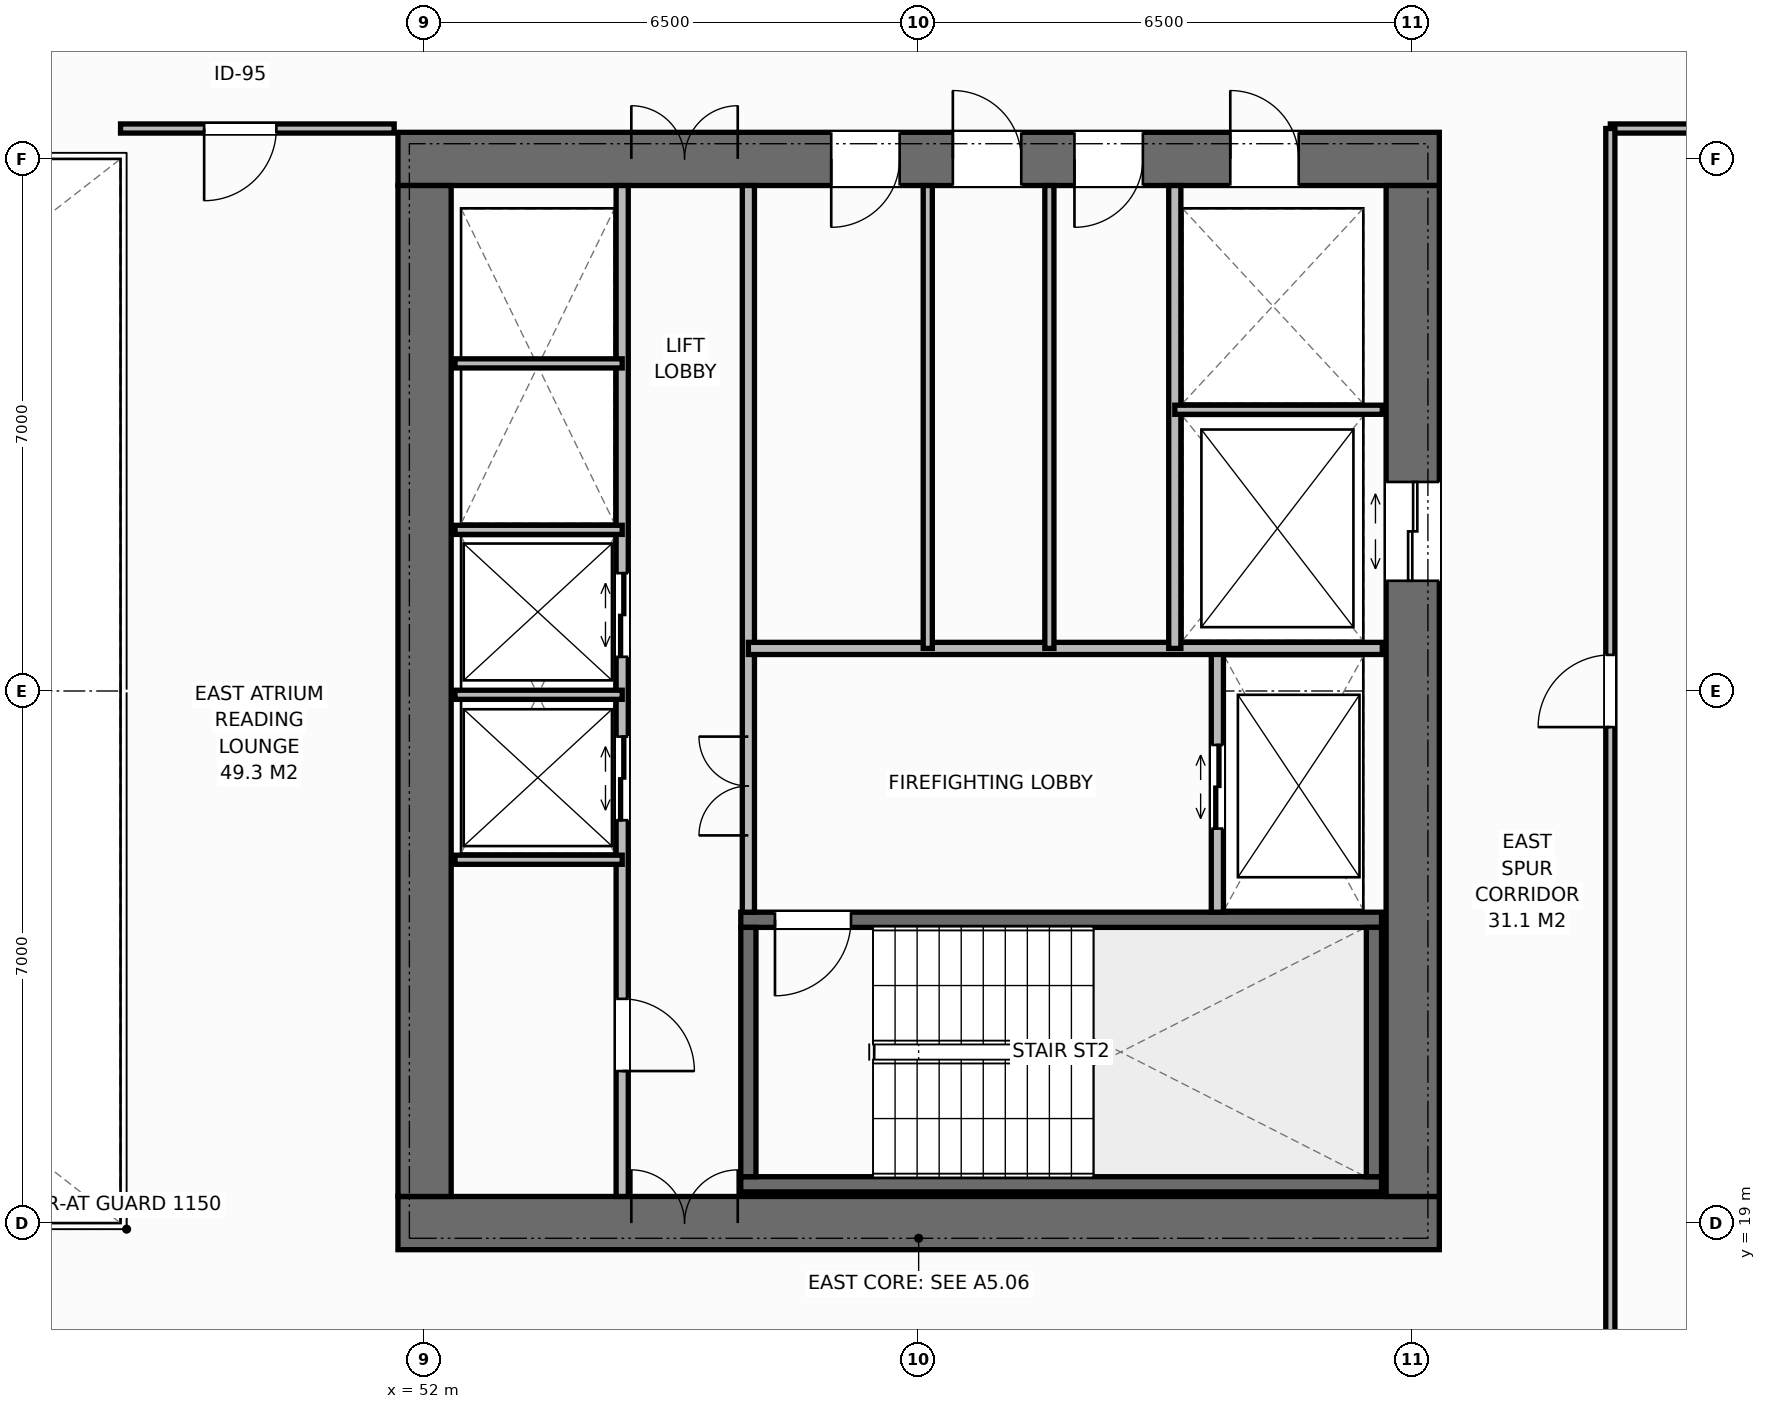
"""IFC4 building model, lengths in metres.
Left out: names, types, materials, properties, quantities, classifications, styles, units other than length and angle.
Written with IfcOpenShell. Run it as: python <this file> out.ifc"""

import sys

from ifc_helpers import new_model, si_unit, direction, frame, frame_2d, origin, place, context, subcontext, project, spatial, rectangle, extrude, element, fill, save


model = new_model("IFC4")
c1 = context("Model", 3, precision=1e-05, world=origin(), true_north=direction((0.0, 1.0)))
c2 = subcontext(c1, "Body", "Model", "MODEL_VIEW")
j1 = project(units=[si_unit("LENGTHUNIT", "METRE"), si_unit("PLANEANGLEUNIT", "RADIAN")], contexts=[c1])
p1 = place(None, origin())
s1 = spatial("IfcSite", under=j1, at=p1, CompositionType="ELEMENT")
p2 = place(p1, origin())
s2 = spatial("IfcBuilding", under=s1, at=p2, CompositionType="ELEMENT")
p3 = place(p2, frame((0.0, 0.0, 112.6)))
s3 = spatial("IfcBuildingStorey", under=s2, at=p3, CompositionType="ELEMENT", Elevation=112.6)
p4 = place(p3, frame((51.65, 19.0, 0.0), z_axis=(0.0, 0.0, 1.0), x_axis=(1.0, 0.0, 0.0)))
e1 = element("IfcWall", 1, at=p4, inside=s3, PredefinedType="SHEAR", context=c2, shape_type="SweptSolid", body=[
    extrude(rectangle(XDim=13.7, YDim=0.7, at=frame_2d((6.85, 0.0))), origin(), (0.0, 0.0, 1.0), 3.8),
])
p5 = place(p4, frame((3.07, 0.0, 0.0)))
e2 = element("IfcOpeningElement", 2, at=p5, cuts=e1, PredefinedType="OPENING", context=c2, shape_type="SweptSolid", body=[
    extrude(rectangle(XDim=1.4, YDim=2.2, at=frame_2d((0.7, 1.1))), frame((0.0, 0.36, 0.0), z_axis=(0.0, -1.0, 0.0), x_axis=(1.0, 0.0, 0.0)), (0.0, 0.0, 1.0), 0.72),
])
p6 = place(p3, frame((51.65, 33.0, 0.0), z_axis=(0.0, 0.0, 1.0), x_axis=(1.0, 0.0, 0.0)))
e3 = element("IfcWall", 3, at=p6, inside=s3, PredefinedType="SHEAR", context=c2, shape_type="SweptSolid", body=[
    extrude(rectangle(XDim=13.7, YDim=0.7, at=frame_2d((6.85, 0.0))), origin(), (0.0, 0.0, 1.0), 3.8),
])
p7 = place(p6, frame((3.07, 0.0, 0.0)))
e4 = element("IfcOpeningElement", 4, at=p7, cuts=e3, PredefinedType="OPENING", context=c2, shape_type="SweptSolid", body=[
    extrude(rectangle(XDim=1.4, YDim=2.2, at=frame_2d((0.7, 1.1))), frame((0.0, 0.36, 0.0), z_axis=(0.0, -1.0, 0.0), x_axis=(1.0, 0.0, 0.0)), (0.0, 0.0, 1.0), 0.72),
])
p8 = place(p6, frame((10.95, 0.0, 0.0)))
e5 = element("IfcOpeningElement", 5, at=p8, cuts=e3, PredefinedType="OPENING", context=c2, shape_type="SweptSolid", body=[
    extrude(rectangle(XDim=0.9, YDim=2.15, at=frame_2d((0.45, 1.075))), frame((0.0, 0.36, 0.0), z_axis=(0.0, -1.0, 0.0), x_axis=(1.0, 0.0, 0.0)), (0.0, 0.0, 1.0), 0.72),
])
p9 = place(p6, frame((5.7, 0.0, 0.0)))
e6 = element("IfcOpeningElement", 6, at=p9, cuts=e3, PredefinedType="OPENING", context=c2, shape_type="SweptSolid", body=[
    extrude(rectangle(XDim=0.9, YDim=2.15, at=frame_2d((0.45, 1.075))), frame((0.0, 0.36, 0.0), z_axis=(0.0, -1.0, 0.0), x_axis=(1.0, 0.0, 0.0)), (0.0, 0.0, 1.0), 0.72),
])
p10 = place(p6, frame((7.3, 0.0, 0.0)))
e7 = element("IfcOpeningElement", 7, at=p10, cuts=e3, PredefinedType="OPENING", context=c2, shape_type="SweptSolid", body=[
    extrude(rectangle(XDim=0.9, YDim=2.15, at=frame_2d((0.45, 1.075))), frame((0.0, 0.36, 0.0), z_axis=(0.0, -1.0, 0.0), x_axis=(1.0, 0.0, 0.0)), (0.0, 0.0, 1.0), 0.72),
])
p11 = place(p6, frame((8.9, 0.0, 0.0)))
e8 = element("IfcOpeningElement", 8, at=p11, cuts=e3, PredefinedType="OPENING", context=c2, shape_type="SweptSolid", body=[
    extrude(rectangle(XDim=0.9, YDim=2.15, at=frame_2d((0.45, 1.075))), frame((0.0, 0.36, 0.0), z_axis=(0.0, -1.0, 0.0), x_axis=(1.0, 0.0, 0.0)), (0.0, 0.0, 1.0), 0.72),
])
p12 = place(p3, frame((52.0, 19.35, 0.0), z_axis=(0.0, 0.0, 1.0), x_axis=(0.0, 1.0, 0.0)))
e9 = element("IfcWall", 9, at=p12, inside=s3, PredefinedType="SHEAR", context=c2, shape_type="SweptSolid", body=[
    extrude(rectangle(XDim=13.3, YDim=0.7, at=frame_2d((6.65, 0.0))), origin(), (0.0, 0.0, 1.0), 3.8),
])
p13 = place(p3, frame((65.0, 19.35, 0.0), z_axis=(0.0, 0.0, 1.0), x_axis=(0.0, 1.0, 0.0)))
e10 = element("IfcWall", 10, at=p13, inside=s3, PredefinedType="SHEAR", context=c2, shape_type="SweptSolid", body=[
    extrude(rectangle(XDim=13.3, YDim=0.7, at=frame_2d((6.65, 0.0))), origin(), (0.0, 0.0, 1.0), 3.8),
])
p14 = place(p13, frame((8.1, 0.0, 0.0)))
e11 = element("IfcOpeningElement", 11, at=p14, cuts=e10, PredefinedType="OPENING", context=c2, shape_type="SweptSolid", body=[
    extrude(rectangle(XDim=1.3, YDim=2.2, at=frame_2d((0.65, 1.1))), frame((0.0, 0.36, 0.0), z_axis=(0.0, -1.0, 0.0), x_axis=(1.0, 0.0, 0.0)), (0.0, 0.0, 1.0), 0.72),
])
p15 = place(p3, frame((56.16, 19.51, 0.0), z_axis=(0.0, 0.0, 1.0), x_axis=(1.0, 0.0, 0.0)))
e12 = element("IfcWall", 12, at=p15, inside=s3, PredefinedType="SHEAR", context=c2, shape_type="SweptSolid", body=[
    extrude(rectangle(XDim=8.43, YDim=0.2, at=frame_2d((4.215, 0.0))), origin(), (0.0, 0.0, 1.0), 3.8),
])
p16 = place(p3, frame((56.16, 22.99, 0.0), z_axis=(0.0, 0.0, 1.0), x_axis=(1.0, 0.0, 0.0)))
e13 = element("IfcWall", 13, at=p16, inside=s3, PredefinedType="SHEAR", context=c2, shape_type="SweptSolid", body=[
    extrude(rectangle(XDim=8.43, YDim=0.2, at=frame_2d((4.215, 0.0))), origin(), (0.0, 0.0, 1.0), 3.8),
])
p17 = place(p16, frame((0.45, 0.0, 0.0)))
e14 = element("IfcOpeningElement", 14, at=p17, cuts=e13, PredefinedType="OPENING", context=c2, shape_type="SweptSolid", body=[
    extrude(rectangle(XDim=1.0, YDim=2.15, at=frame_2d((0.5, 1.075))), frame((0.0, 0.11, 0.0), z_axis=(0.0, -1.0, 0.0), x_axis=(1.0, 0.0, 0.0)), (0.0, 0.0, 1.0), 0.22),
])
for number, where, z_axis, x_axis in (
    (15, (56.26, 19.61, 0.0), (0.0, 0.0, 1.0), (0.0, 1.0, 0.0)),
    (16, (64.49, 19.61, 0.0), (0.0, 0.0, 1.0), (0.0, 1.0, 0.0)),
):
    element("IfcWall", number, at=place(p3, frame(where, z_axis=z_axis, x_axis=x_axis)), inside=s3, PredefinedType="SHEAR", context=c2, shape_type="SweptSolid", body=[
        extrude(rectangle(XDim=3.28, YDim=0.2, at=frame_2d((1.64, 0.0))), origin(), (0.0, 0.0, 1.0), 3.8),
    ])
p18 = place(p3, frame((54.6, 19.35, 0.0), z_axis=(0.0, 0.0, 1.0), x_axis=(0.0, 1.0, 0.0)))
e17 = element("IfcWall", 17, at=p18, inside=s3, PredefinedType="STANDARD", context=c2, shape_type="SweptSolid", body=[
    extrude(rectangle(XDim=13.3, YDim=0.16, at=frame_2d((6.65, 0.0))), origin(), (0.0, 0.0, 1.0), 3.565),
])
p19 = place(p18, frame((1.65, 0.0, 0.0)))
e18 = element("IfcOpeningElement", 18, at=p19, cuts=e17, PredefinedType="OPENING", context=c2, shape_type="SweptSolid", body=[
    extrude(rectangle(XDim=0.95, YDim=2.15, at=frame_2d((0.475, 1.075))), frame((0.0, 0.09, 0.0), z_axis=(0.0, -1.0, 0.0), x_axis=(1.0, 0.0, 0.0)), (0.0, 0.0, 1.0), 0.18),
])
p20 = place(p18, frame((4.95, 0.0, 0.0)))
e19 = element("IfcOpeningElement", 19, at=p20, cuts=e17, PredefinedType="OPENING", context=c2, shape_type="SweptSolid", body=[
    extrude(rectangle(XDim=1.1, YDim=2.2, at=frame_2d((0.55, 1.1))), frame((0.0, 0.09, 0.0), z_axis=(0.0, -1.0, 0.0), x_axis=(1.0, 0.0, 0.0)), (0.0, 0.0, 1.0), 0.18),
])
p21 = place(p18, frame((7.1, 0.0, 0.0)))
e20 = element("IfcOpeningElement", 20, at=p21, cuts=e17, PredefinedType="OPENING", context=c2, shape_type="SweptSolid", body=[
    extrude(rectangle(XDim=1.1, YDim=2.2, at=frame_2d((0.55, 1.1))), frame((0.0, 0.09, 0.0), z_axis=(0.0, -1.0, 0.0), x_axis=(1.0, 0.0, 0.0)), (0.0, 0.0, 1.0), 0.18),
])
p22 = place(p3, frame((56.26, 23.09, 0.0), z_axis=(0.0, 0.0, 1.0), x_axis=(0.0, 1.0, 0.0)))
e21 = element("IfcWall", 21, at=p22, inside=s3, PredefinedType="STANDARD", context=c2, shape_type="SweptSolid", body=[
    extrude(rectangle(XDim=9.56, YDim=0.16, at=frame_2d((4.78, 0.0))), origin(), (0.0, 0.0, 1.0), 3.565),
])
p23 = place(p22, frame((1.01, 0.0, 0.0)))
e22 = element("IfcOpeningElement", 22, at=p23, cuts=e21, PredefinedType="OPENING", context=c2, shape_type="SweptSolid", body=[
    extrude(rectangle(XDim=1.3, YDim=2.2, at=frame_2d((0.65, 1.1))), frame((0.0, 0.09, 0.0), z_axis=(0.0, -1.0, 0.0), x_axis=(1.0, 0.0, 0.0)), (0.0, 0.0, 1.0), 0.18),
])
for number, where, z_axis, x_axis in (
    (23, (52.4, 23.78, 0.0), (0.0, 0.0, 1.0), (1.0, 0.0, 0.0)),
    (24, (52.4, 25.95, 0.0), (0.0, 0.0, 1.0), (1.0, 0.0, 0.0)),
    (25, (52.4, 28.12, 0.0), (0.0, 0.0, 1.0), (1.0, 0.0, 0.0)),
    (26, (52.4, 30.31, 0.0), (0.0, 0.0, 1.0), (1.0, 0.0, 0.0)),
):
    element("IfcWall", number, at=place(p3, frame(where, z_axis=z_axis, x_axis=x_axis)), inside=s3, PredefinedType="PARTITIONING", context=c2, shape_type="SweptSolid", body=[
        extrude(rectangle(XDim=2.2, YDim=0.12, at=frame_2d((1.1, 0.0))), origin(), (0.0, 0.0, 1.0), 3.565),
    ])
p24 = place(p3, frame((62.43, 23.09, 0.0), z_axis=(0.0, 0.0, 1.0), x_axis=(0.0, 1.0, 0.0)))
e27 = element("IfcWall", 27, at=p24, inside=s3, PredefinedType="STANDARD", context=c2, shape_type="SweptSolid", body=[
    extrude(rectangle(XDim=3.47, YDim=0.16, at=frame_2d((1.735, 0.0))), origin(), (0.0, 0.0, 1.0), 3.565),
])
p25 = place(p24, frame((1.1, 0.0, 0.0)))
e28 = element("IfcOpeningElement", 28, at=p25, cuts=e27, PredefinedType="OPENING", context=c2, shape_type="SweptSolid", body=[
    extrude(rectangle(XDim=1.1, YDim=2.2, at=frame_2d((0.55, 1.1))), frame((0.0, 0.09, 0.0), z_axis=(0.0, -1.0, 0.0), x_axis=(1.0, 0.0, 0.0)), (0.0, 0.0, 1.0), 0.18),
])
p26 = place(p3, frame((56.26, 26.56, 0.0), z_axis=(0.0, 0.0, 1.0), x_axis=(1.0, 0.0, 0.0)))
e29 = element("IfcWall", 29, at=p26, inside=s3, PredefinedType="STANDARD", context=c2, shape_type="SweptSolid", body=[
    extrude(rectangle(XDim=8.34, YDim=0.16, at=frame_2d((4.17, 0.0))), origin(), (0.0, 0.0, 1.0), 3.565),
])
p27 = place(p3, frame((61.87, 26.56, 0.0), z_axis=(0.0, 0.0, 1.0), x_axis=(0.0, 1.0, 0.0)))
e30 = element("IfcWall", 30, at=p27, inside=s3, PredefinedType="STANDARD", context=c2, shape_type="SweptSolid", body=[
    extrude(rectangle(XDim=6.09, YDim=0.16, at=frame_2d((3.045, 0.0))), origin(), (0.0, 0.0, 1.0), 3.565),
])
p28 = place(p3, frame((61.87, 29.7, 0.0), z_axis=(0.0, 0.0, 1.0), x_axis=(1.0, 0.0, 0.0)))
e31 = element("IfcWall", 31, at=p28, inside=s3, PredefinedType="PARTITIONING", context=c2, shape_type="SweptSolid", body=[
    extrude(rectangle(XDim=2.73, YDim=0.12, at=frame_2d((1.365, 0.0))), origin(), (0.0, 0.0, 1.0), 3.565),
])
for number, where, z_axis, x_axis in (
    (32, (58.62, 26.56, 0.0), (0.0, 0.0, 1.0), (0.0, 1.0, 0.0)),
    (33, (60.22, 26.56, 0.0), (0.0, 0.0, 1.0), (0.0, 1.0, 0.0)),
):
    element("IfcWall", number, at=place(p3, frame(where, z_axis=z_axis, x_axis=x_axis)), inside=s3, PredefinedType="PARTITIONING", context=c2, shape_type="SweptSolid", body=[
        extrude(rectangle(XDim=6.09, YDim=0.12, at=frame_2d((3.045, 0.0))), origin(), (0.0, 0.0, 1.0), 3.565),
    ])
p29 = place(p3, frame((48.0, 33.4, 0.0), z_axis=(0.0, 0.0, 1.0), x_axis=(1.0, 0.0, 0.0)))
e34 = element("IfcWall", 34, at=p29, inside=s3, PredefinedType="PARTITIONING", context=c2, shape_type="SweptSolid", body=[
    extrude(rectangle(XDim=3.6, YDim=0.12, at=frame_2d((1.8, 0.0))), origin(), (0.0, 0.0, 1.0), 3.565),
])
p30 = place(p29, frame((1.1, 0.0, 0.0)))
e35 = element("IfcOpeningElement", 35, at=p30, cuts=e34, PredefinedType="OPENING", context=c2, shape_type="SweptSolid", body=[
    extrude(rectangle(XDim=0.95, YDim=2.15, at=frame_2d((0.475, 1.075))), frame((0.0, 0.07, 0.0), z_axis=(0.0, -1.0, 0.0), x_axis=(1.0, 0.0, 0.0)), (0.0, 0.0, 1.0), 0.14),
])
p31 = place(p3, frame((67.6, 33.4, 0.0), z_axis=(0.0, 0.0, 1.0), x_axis=(1.0, 0.0, 0.0)))
e36 = element("IfcWall", 36, at=p31, inside=s3, PredefinedType="PARTITIONING", context=c2, shape_type="SweptSolid", body=[
    extrude(rectangle(XDim=8.58, YDim=0.12, at=frame_2d((4.29, 0.0))), origin(), (0.0, 0.0, 1.0), 3.565),
])
p32 = place(p3, frame((67.6, 16.5, 0.0), z_axis=(0.0, 0.0, 1.0), x_axis=(0.0, 1.0, 0.0)))
e37 = element("IfcWall", 37, at=p32, inside=s3, PredefinedType="PARTITIONING", context=c2, shape_type="SweptSolid", body=[
    extrude(rectangle(XDim=16.9, YDim=0.12, at=frame_2d((8.45, 0.0))), origin(), (0.0, 0.0, 1.0), 3.565),
])
p33 = place(p32, frame((9.025, 0.0, 0.0)))
e38 = element("IfcOpeningElement", 38, at=p33, cuts=e37, PredefinedType="OPENING", context=c2, shape_type="SweptSolid", body=[
    extrude(rectangle(XDim=0.95, YDim=2.15, at=frame_2d((0.475, 1.075))), frame((0.0, 0.07, 0.0), z_axis=(0.0, -1.0, 0.0), x_axis=(1.0, 0.0, 0.0)), (0.0, 0.0, 1.0), 0.14),
])
p34 = place(p5, origin())
e39 = element("IfcDoor", 39, at=p34, inside=s3, OperationType="DOUBLE_DOOR_SINGLE_SWING", PredefinedType="DOOR", context=c2, shape_type="SweptSolid", body=[
    extrude(rectangle(XDim=1.4, YDim=2.2, at=frame_2d((0.7, 1.1))), frame((0.0, 0.125, 0.0), z_axis=(0.0, -1.0, 0.0), x_axis=(1.0, 0.0, 0.0)), (0.0, 0.0, 1.0), 0.05),
])
fill(e2, e39)
p35 = place(p7, origin())
e40 = element("IfcDoor", 40, at=p35, inside=s3, OperationType="DOUBLE_DOOR_SINGLE_SWING", PredefinedType="DOOR", context=c2, shape_type="SweptSolid", body=[
    extrude(rectangle(XDim=1.4, YDim=2.2, at=frame_2d((0.7, 1.1))), frame((0.0, -0.075, 0.0), z_axis=(0.0, -1.0, 0.0), x_axis=(1.0, 0.0, 0.0)), (0.0, 0.0, 1.0), 0.05),
])
fill(e4, e40)
p36 = place(p19, origin())
e41 = element("IfcDoor", 41, at=p36, inside=s3, OperationType="SINGLE_SWING_RIGHT", PredefinedType="DOOR", context=c2, shape_type="SweptSolid", body=[
    extrude(rectangle(XDim=0.95, YDim=2.15, at=frame_2d((0.475, 1.075))), frame((0.0, 0.025, 0.0), z_axis=(0.0, -1.0, 0.0), x_axis=(1.0, 0.0, 0.0)), (0.0, 0.0, 1.0), 0.05),
])
fill(e18, e41)
p37 = place(p20, origin())
e42 = element("IfcDoor", 42, at=p37, inside=s3, OperationType="DOUBLE_DOOR_SLIDING", PredefinedType="DOOR", context=c2, shape_type="SweptSolid", body=[
    extrude(rectangle(XDim=1.1, YDim=2.2, at=frame_2d((0.55, 1.1))), frame((0.0, 0.025, 0.0), z_axis=(0.0, -1.0, 0.0), x_axis=(1.0, 0.0, 0.0)), (0.0, 0.0, 1.0), 0.05),
])
fill(e19, e42)
p38 = place(p21, origin())
e43 = element("IfcDoor", 43, at=p38, inside=s3, OperationType="DOUBLE_DOOR_SLIDING", PredefinedType="DOOR", context=c2, shape_type="SweptSolid", body=[
    extrude(rectangle(XDim=1.1, YDim=2.2, at=frame_2d((0.55, 1.1))), frame((0.0, 0.025, 0.0), z_axis=(0.0, -1.0, 0.0), x_axis=(1.0, 0.0, 0.0)), (0.0, 0.0, 1.0), 0.05),
])
fill(e20, e43)
p39 = place(p17, origin())
e44 = element("IfcDoor", 44, at=p39, inside=s3, OperationType="SINGLE_SWING_RIGHT", PredefinedType="DOOR", context=c2, shape_type="SweptSolid", body=[
    extrude(rectangle(XDim=1.0, YDim=2.15, at=frame_2d((0.5, 1.075))), frame((0.0, 0.025, 0.0), z_axis=(0.0, -1.0, 0.0), x_axis=(1.0, 0.0, 0.0)), (0.0, 0.0, 1.0), 0.05),
])
fill(e14, e44)
p40 = place(p25, origin())
e45 = element("IfcDoor", 45, at=p40, inside=s3, OperationType="DOUBLE_DOOR_SLIDING", PredefinedType="DOOR", context=c2, shape_type="SweptSolid", body=[
    extrude(rectangle(XDim=1.1, YDim=2.2, at=frame_2d((0.55, 1.1))), frame((0.0, 0.025, 0.0), z_axis=(0.0, -1.0, 0.0), x_axis=(1.0, 0.0, 0.0)), (0.0, 0.0, 1.0), 0.05),
])
fill(e28, e45)
p41 = place(p23, origin())
e46 = element("IfcDoor", 46, at=p41, inside=s3, OperationType="DOUBLE_DOOR_SINGLE_SWING", PredefinedType="DOOR", context=c2, shape_type="SweptSolid", body=[
    extrude(rectangle(XDim=1.3, YDim=2.2, at=frame_2d((0.65, 1.1))), frame((0.0, 0.025, 0.0), z_axis=(0.0, -1.0, 0.0), x_axis=(1.0, 0.0, 0.0)), (0.0, 0.0, 1.0), 0.05),
])
fill(e22, e46)
p42 = place(p14, origin())
e47 = element("IfcDoor", 47, at=p42, inside=s3, OperationType="DOUBLE_DOOR_SLIDING", PredefinedType="DOOR", context=c2, shape_type="SweptSolid", body=[
    extrude(rectangle(XDim=1.3, YDim=2.2, at=frame_2d((0.65, 1.1))), frame((0.0, 0.025, 0.0), z_axis=(0.0, -1.0, 0.0), x_axis=(1.0, 0.0, 0.0)), (0.0, 0.0, 1.0), 0.05),
])
fill(e11, e47)
p43 = place(p8, origin())
e48 = element("IfcDoor", 48, at=p43, inside=s3, OperationType="SINGLE_SWING_LEFT", PredefinedType="DOOR", context=c2, shape_type="SweptSolid", body=[
    extrude(rectangle(XDim=0.9, YDim=2.15, at=frame_2d((0.45, 1.075))), frame((0.0, -0.075, 0.0), z_axis=(0.0, -1.0, 0.0), x_axis=(1.0, 0.0, 0.0)), (0.0, 0.0, 1.0), 0.05),
])
fill(e5, e48)
p44 = place(p9, origin())
e49 = element("IfcDoor", 49, at=p44, inside=s3, OperationType="SINGLE_SWING_RIGHT", PredefinedType="DOOR", context=c2, shape_type="SweptSolid", body=[
    extrude(rectangle(XDim=0.9, YDim=2.15, at=frame_2d((0.45, 1.075))), frame((0.0, -0.075, 0.0), z_axis=(0.0, -1.0, 0.0), x_axis=(1.0, 0.0, 0.0)), (0.0, 0.0, 1.0), 0.05),
])
fill(e6, e49)
p45 = place(p10, origin())
e50 = element("IfcDoor", 50, at=p45, inside=s3, OperationType="SINGLE_SWING_LEFT", PredefinedType="DOOR", context=c2, shape_type="SweptSolid", body=[
    extrude(rectangle(XDim=0.9, YDim=2.15, at=frame_2d((0.45, 1.075))), frame((0.0, -0.075, 0.0), z_axis=(0.0, -1.0, 0.0), x_axis=(1.0, 0.0, 0.0)), (0.0, 0.0, 1.0), 0.05),
])
fill(e7, e50)
p46 = place(p11, origin())
e51 = element("IfcDoor", 51, at=p46, inside=s3, OperationType="SINGLE_SWING_RIGHT", PredefinedType="DOOR", context=c2, shape_type="SweptSolid", body=[
    extrude(rectangle(XDim=0.9, YDim=2.15, at=frame_2d((0.45, 1.075))), frame((0.0, -0.075, 0.0), z_axis=(0.0, -1.0, 0.0), x_axis=(1.0, 0.0, 0.0)), (0.0, 0.0, 1.0), 0.05),
])
fill(e8, e51)
p47 = place(p30, origin())
e52 = element("IfcDoor", 52, at=p47, inside=s3, OperationType="SINGLE_SWING_RIGHT", PredefinedType="DOOR", context=c2, shape_type="SweptSolid", body=[
    extrude(rectangle(XDim=0.95, YDim=2.15, at=frame_2d((0.475, 1.075))), frame((0.0, 0.025, 0.0), z_axis=(0.0, -1.0, 0.0), x_axis=(1.0, 0.0, 0.0)), (0.0, 0.0, 1.0), 0.05),
])
fill(e35, e52)
p48 = place(p33, origin())
e53 = element("IfcDoor", 53, at=p48, inside=s3, OperationType="SINGLE_SWING_LEFT", PredefinedType="DOOR", context=c2, shape_type="SweptSolid", body=[
    extrude(rectangle(XDim=0.95, YDim=2.15, at=frame_2d((0.475, 1.075))), frame((0.0, 0.025, 0.0), z_axis=(0.0, -1.0, 0.0), x_axis=(1.0, 0.0, 0.0)), (0.0, 0.0, 1.0), 0.05),
])
fill(e38, e53)
save(model, sys.argv[1])
